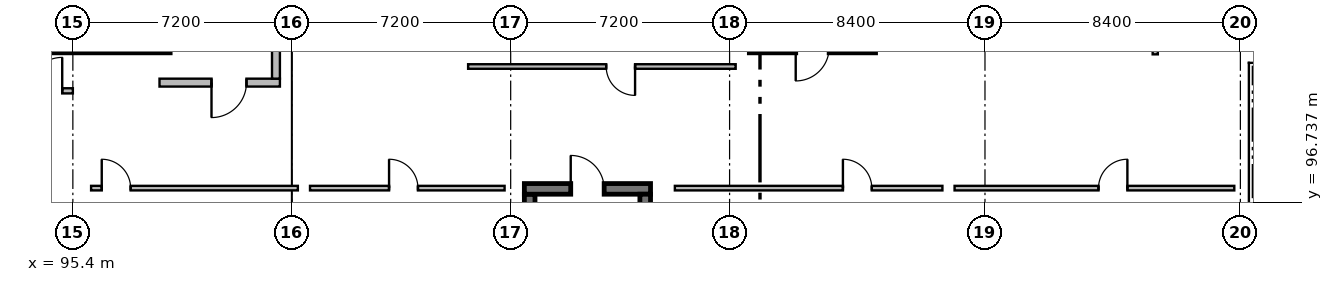
"""IFC4 building model, lengths in metres.
Left out: names, types, materials, properties, quantities, classifications, styles, units other than length and angle.
Written with IfcOpenShell. Run it as: python <this file> out.ifc"""

import sys

from ifc_helpers import new_model, si_unit, direction, frame, frame_2d, origin, place, context, subcontext, project, spatial, rectangle, extrude, element, fill, save


model = new_model("IFC4")
c1 = context("Model", 3, precision=1e-05, world=origin(), true_north=direction((0.0, 1.0)))
c2 = subcontext(c1, "Body", "Model", "MODEL_VIEW")
j1 = project(units=[si_unit("LENGTHUNIT", "METRE"), si_unit("PLANEANGLEUNIT", "RADIAN")], contexts=[c1])
p1 = place(None, origin())
s1 = spatial("IfcSite", under=j1, at=p1, CompositionType="ELEMENT")
p2 = place(p1, origin())
s2 = spatial("IfcBuilding", under=s1, at=p2, CompositionType="ELEMENT")
p3 = place(p2, frame((0.0, 0.0, 4.8)))
s3 = spatial("IfcBuildingStorey", under=s2, at=p3, CompositionType="ELEMENT", Elevation=4.8)
p4 = place(p3, frame((98.6, 101.825, 0.0), z_axis=(0.0, 0.0, 1.0), x_axis=(-1.0, 0.0, 0.0)))
e1 = element("IfcWall", 1, at=p4, inside=s3, PredefinedType="SOLIDWALL", context=c2, shape_type="SweptSolid", body=[
    extrude(rectangle(XDim=4.15, YDim=0.35, at=frame_2d((2.075, 0.0))), origin(), (0.0, 0.0, 1.0), 4.2),
])
p5 = place(p3, frame((102.21, 100.67, 0.0), z_axis=(0.0, 0.0, 1.0), x_axis=(-1.0, 0.0, 0.0)))
e2 = element("IfcWall", 2, at=p5, inside=s3, PredefinedType="SOLIDWALL", context=c2, shape_type="SweptSolid", body=[
    extrude(rectangle(XDim=3.96, YDim=0.26, at=frame_2d((1.98, 0.0))), origin(), (0.0, 0.0, 1.0), 3.94),
])
p6 = place(p5, frame((1.1, 0.0, 0.0)))
e3 = element("IfcOpeningElement", 3, at=p6, cuts=e2, PredefinedType="OPENING", context=c2, shape_type="SweptSolid", body=[
    extrude(rectangle(XDim=1.15, YDim=2.2, at=frame_2d((0.575, 1.1))), frame((0.0, 0.15, 0.0), z_axis=(0.0, -1.0, 0.0), x_axis=(1.0, 0.0, 0.0)), (0.0, 0.0, 1.0), 0.3),
])
p7 = place(p3, frame((102.08, 106.65, 0.0), z_axis=(0.0, 0.0, 1.0), x_axis=(0.0, -1.0, 0.0)))
e4 = element("IfcWall", 4, at=p7, inside=s3, PredefinedType="SOLIDWALL", context=c2, shape_type="SweptSolid", body=[
    extrude(rectangle(XDim=5.85, YDim=0.26, at=frame_2d((2.925, 0.0))), origin(), (0.0, 0.0, 1.0), 3.94),
])
p8 = place(p3, frame((121.8, 101.825, 0.0), z_axis=(0.0, 0.0, 1.0), x_axis=(-1.0, 0.0, 0.0)))
e5 = element("IfcWall", 5, at=p8, inside=s3, PredefinedType="SOLIDWALL", context=c2, shape_type="SweptSolid", body=[
    extrude(rectangle(XDim=4.15, YDim=0.35, at=frame_2d((2.075, 0.0))), origin(), (0.0, 0.0, 1.0), 4.2),
])
p9 = place(p8, frame((1.525, 0.0, 0.0)))
e6 = element("IfcOpeningElement", 6, at=p9, cuts=e5, PredefinedType="OPENING", context=c2, shape_type="SweptSolid", body=[
    extrude(rectangle(XDim=1.1, YDim=2.15, at=frame_2d((0.55, 1.075))), frame((0.0, 0.195, 0.0), z_axis=(0.0, -1.0, 0.0), x_axis=(1.0, 0.0, 0.0)), (0.0, 0.0, 1.0), 0.39),
])
p10 = place(p3, frame((110.425, 89.2, 0.0), z_axis=(0.0, 0.0, 1.0), x_axis=(0.0, 1.0, 0.0)))
e7 = element("IfcWall", 7, at=p10, inside=s3, PredefinedType="SOLIDWALL", context=c2, shape_type="SweptSolid", body=[
    extrude(rectangle(XDim=7.8, YDim=0.35, at=frame_2d((3.9, 0.0))), origin(), (0.0, 0.0, 1.0), 4.2),
])
p11 = place(p3, frame((110.25, 97.175, 0.0), z_axis=(0.0, 0.0, 1.0), x_axis=(1.0, 0.0, 0.0)))
e8 = element("IfcWall", 8, at=p11, inside=s3, PredefinedType="SOLIDWALL", context=c2, shape_type="SweptSolid", body=[
    extrude(rectangle(XDim=4.15, YDim=0.35, at=frame_2d((2.075, 0.0))), origin(), (0.0, 0.0, 1.0), 4.2),
])
p12 = place(p11, frame((1.525, 0.0, 0.0)))
e9 = element("IfcOpeningElement", 9, at=p12, cuts=e8, PredefinedType="OPENING", context=c2, shape_type="SweptSolid", body=[
    extrude(rectangle(XDim=1.1, YDim=2.15, at=frame_2d((0.55, 1.075))), frame((0.0, 0.195, 0.0), z_axis=(0.0, -1.0, 0.0), x_axis=(1.0, 0.0, 0.0)), (0.0, 0.0, 1.0), 0.39),
])
p13 = place(p3, frame((114.225, 97.0, 0.0), z_axis=(0.0, 0.0, 1.0), x_axis=(0.0, -1.0, 0.0)))
e10 = element("IfcWall", 10, at=p13, inside=s3, PredefinedType="SOLIDWALL", context=c2, shape_type="SweptSolid", body=[
    extrude(rectangle(XDim=7.8, YDim=0.35, at=frame_2d((3.9, 0.0))), origin(), (0.0, 0.0, 1.0), 4.2),
])
p14 = place(p3, frame((131.0, 101.6, 0.0), z_axis=(0.0, 0.0, 1.0), x_axis=(0.0, 1.0, 0.0)))
e11 = element("IfcWall", 11, at=p14, inside=s3, PredefinedType="PARTITIONING", context=c2, shape_type="SweptSolid", body=[
    extrude(rectangle(XDim=9.4, YDim=0.17, at=frame_2d((4.7, 0.0))), origin(), (0.0, 0.0, 1.0), 3.94),
])
p15 = place(p14, frame((5.564, 0.0, 0.0)))
e12 = element("IfcOpeningElement", 12, at=p15, cuts=e11, PredefinedType="OPENING", context=c2, shape_type="SweptSolid", body=[
    extrude(rectangle(XDim=1.5, YDim=2.25, at=frame_2d((0.75, 1.125))), frame((0.0, 0.105, 0.0), z_axis=(0.0, -1.0, 0.0), x_axis=(1.0, 0.0, 0.0)), (0.0, 0.0, 1.0), 0.21),
])
p16 = place(p3, frame((96.0, 97.2, 0.0), z_axis=(0.0, 0.0, 1.0), x_axis=(1.0, 0.0, 0.0)))
e13 = element("IfcWall", 13, at=p16, inside=s3, PredefinedType="PARTITIONING", context=c2, shape_type="SweptSolid", body=[
    extrude(rectangle(XDim=6.8, YDim=0.15, at=frame_2d((3.4, 0.0))), origin(), (0.0, 0.0, 1.0), 3.94),
])
p17 = place(p16, frame((0.35, 0.0, 0.0)))
e14 = element("IfcOpeningElement", 14, at=p17, cuts=e13, PredefinedType="OPENING", context=c2, shape_type="SweptSolid", body=[
    extrude(rectangle(XDim=0.95, YDim=2.2, at=frame_2d((0.475, 1.1))), frame((0.0, 0.095, 0.0), z_axis=(0.0, -1.0, 0.0), x_axis=(1.0, 0.0, 0.0)), (0.0, 0.0, 1.0), 0.19),
])
p18 = place(p3, frame((103.2, 97.2, 0.0), z_axis=(0.0, 0.0, 1.0), x_axis=(1.0, 0.0, 0.0)))
e15 = element("IfcWall", 15, at=p18, inside=s3, PredefinedType="PARTITIONING", context=c2, shape_type="SweptSolid", body=[
    extrude(rectangle(XDim=6.4, YDim=0.15, at=frame_2d((3.2, 0.0))), origin(), (0.0, 0.0, 1.0), 3.94),
])
p19 = place(p18, frame((2.6, 0.0, 0.0)))
e16 = element("IfcOpeningElement", 16, at=p19, cuts=e15, PredefinedType="OPENING", context=c2, shape_type="SweptSolid", body=[
    extrude(rectangle(XDim=0.95, YDim=2.2, at=frame_2d((0.475, 1.1))), frame((0.0, 0.095, 0.0), z_axis=(0.0, -1.0, 0.0), x_axis=(1.0, 0.0, 0.0)), (0.0, 0.0, 1.0), 0.19),
])
p20 = place(p3, frame((115.2, 97.2, 0.0), z_axis=(0.0, 0.0, 1.0), x_axis=(1.0, 0.0, 0.0)))
e17 = element("IfcWall", 17, at=p20, inside=s3, PredefinedType="PARTITIONING", context=c2, shape_type="SweptSolid", body=[
    extrude(rectangle(XDim=8.8, YDim=0.15, at=frame_2d((4.4, 0.0))), origin(), (0.0, 0.0, 1.0), 3.94),
])
p21 = place(p20, frame((5.528, 0.0, 0.0)))
e18 = element("IfcOpeningElement", 18, at=p21, cuts=e17, PredefinedType="OPENING", context=c2, shape_type="SweptSolid", body=[
    extrude(rectangle(XDim=0.95, YDim=2.2, at=frame_2d((0.475, 1.1))), frame((0.0, 0.095, 0.0), z_axis=(0.0, -1.0, 0.0), x_axis=(1.0, 0.0, 0.0)), (0.0, 0.0, 1.0), 0.19),
])
p22 = place(p3, frame((117.2, 101.2, 0.0), z_axis=(0.0, 0.0, 1.0), x_axis=(-1.0, 0.0, 0.0)))
e19 = element("IfcWall", 19, at=p22, inside=s3, PredefinedType="PARTITIONING", context=c2, shape_type="SweptSolid", body=[
    extrude(rectangle(XDim=8.8, YDim=0.15, at=frame_2d((4.4, 0.0))), origin(), (0.0, 0.0, 1.0), 3.94),
])
p23 = place(p22, frame((3.309, 0.0, 0.0)))
e20 = element("IfcOpeningElement", 20, at=p23, cuts=e19, PredefinedType="OPENING", context=c2, shape_type="SweptSolid", body=[
    extrude(rectangle(XDim=0.95, YDim=2.2, at=frame_2d((0.475, 1.1))), frame((0.0, 0.095, 0.0), z_axis=(0.0, -1.0, 0.0), x_axis=(1.0, 0.0, 0.0)), (0.0, 0.0, 1.0), 0.19),
])
p24 = place(p3, frame((90.2, 100.4, 0.0), z_axis=(0.0, 0.0, 1.0), x_axis=(1.0, 0.0, 0.0)))
e21 = element("IfcWall", 21, at=p24, inside=s3, PredefinedType="PARTITIONING", context=c2, shape_type="SweptSolid", body=[
    extrude(rectangle(XDim=5.2, YDim=0.17, at=frame_2d((2.6, 0.0))), origin(), (0.0, 0.0, 1.0), 3.94),
])
p25 = place(p24, frame((3.75, 0.0, 0.0)))
e22 = element("IfcOpeningElement", 22, at=p25, cuts=e21, PredefinedType="OPENING", context=c2, shape_type="SweptSolid", body=[
    extrude(rectangle(XDim=1.1, YDim=2.1, at=frame_2d((0.55, 1.05))), frame((0.0, 0.105, 0.0), z_axis=(0.0, -1.0, 0.0), x_axis=(1.0, 0.0, 0.0)), (0.0, 0.0, 1.0), 0.21),
])
p26 = place(p3, frame((124.4, 97.2, 0.0), z_axis=(0.0, 0.0, 1.0), x_axis=(1.0, 0.0, 0.0)))
e23 = element("IfcWall", 23, at=p26, inside=s3, PredefinedType="PARTITIONING", context=c2, shape_type="SweptSolid", body=[
    extrude(rectangle(XDim=9.2, YDim=0.15, at=frame_2d((4.6, 0.0))), origin(), (0.0, 0.0, 1.0), 3.94),
])
p27 = place(p26, frame((4.734, 0.0, 0.0)))
e24 = element("IfcOpeningElement", 24, at=p27, cuts=e23, PredefinedType="OPENING", context=c2, shape_type="SweptSolid", body=[
    extrude(rectangle(XDim=0.95, YDim=2.2, at=frame_2d((0.475, 1.1))), frame((0.0, 0.095, 0.0), z_axis=(0.0, -1.0, 0.0), x_axis=(1.0, 0.0, 0.0)), (0.0, 0.0, 1.0), 0.19),
])
p28 = place(p6, origin())
e25 = element("IfcDoor", 25, at=p28, inside=s3, OperationType="SINGLE_SWING_RIGHT", PredefinedType="DOOR", context=c2, shape_type="SweptSolid", body=[
    extrude(rectangle(XDim=1.15, YDim=2.2, at=frame_2d((0.575, 1.1))), frame((0.0, 0.025, 0.0), z_axis=(0.0, -1.0, 0.0), x_axis=(1.0, 0.0, 0.0)), (0.0, 0.0, 1.0), 0.05),
])
fill(e3, e25)
p29 = place(p12, origin())
e26 = element("IfcDoor", 26, at=p29, inside=s3, OperationType="SINGLE_SWING_LEFT", PredefinedType="DOOR", context=c2, shape_type="SweptSolid", body=[
    extrude(rectangle(XDim=1.1, YDim=2.15, at=frame_2d((0.55, 1.075))), frame((0.0, 0.025, 0.0), z_axis=(0.0, -1.0, 0.0), x_axis=(1.0, 0.0, 0.0)), (0.0, 0.0, 1.0), 0.05),
])
fill(e9, e26)
p30 = place(p17, origin())
e27 = element("IfcDoor", 27, at=p30, inside=s3, OperationType="SINGLE_SWING_LEFT", PredefinedType="DOOR", context=c2, shape_type="SweptSolid", body=[
    extrude(rectangle(XDim=0.95, YDim=2.2, at=frame_2d((0.475, 1.1))), frame((0.0, 0.025, 0.0), z_axis=(0.0, -1.0, 0.0), x_axis=(1.0, 0.0, 0.0)), (0.0, 0.0, 1.0), 0.05),
])
fill(e14, e27)
p31 = place(p19, origin())
e28 = element("IfcDoor", 28, at=p31, inside=s3, OperationType="SINGLE_SWING_LEFT", PredefinedType="DOOR", context=c2, shape_type="SweptSolid", body=[
    extrude(rectangle(XDim=0.95, YDim=2.2, at=frame_2d((0.475, 1.1))), frame((0.0, 0.025, 0.0), z_axis=(0.0, -1.0, 0.0), x_axis=(1.0, 0.0, 0.0)), (0.0, 0.0, 1.0), 0.05),
])
fill(e16, e28)
p32 = place(p21, origin())
e29 = element("IfcDoor", 29, at=p32, inside=s3, OperationType="SINGLE_SWING_LEFT", PredefinedType="DOOR", context=c2, shape_type="SweptSolid", body=[
    extrude(rectangle(XDim=0.95, YDim=2.2, at=frame_2d((0.475, 1.1))), frame((0.0, 0.025, 0.0), z_axis=(0.0, -1.0, 0.0), x_axis=(1.0, 0.0, 0.0)), (0.0, 0.0, 1.0), 0.05),
])
fill(e18, e29)
p33 = place(p23, origin())
e30 = element("IfcDoor", 30, at=p33, inside=s3, OperationType="SINGLE_SWING_LEFT", PredefinedType="DOOR", context=c2, shape_type="SweptSolid", body=[
    extrude(rectangle(XDim=0.95, YDim=2.2, at=frame_2d((0.475, 1.1))), frame((0.0, 0.025, 0.0), z_axis=(0.0, -1.0, 0.0), x_axis=(1.0, 0.0, 0.0)), (0.0, 0.0, 1.0), 0.05),
])
fill(e20, e30)
p34 = place(p25, origin())
e31 = element("IfcDoor", 31, at=p34, inside=s3, OperationType="SINGLE_SWING_RIGHT", PredefinedType="DOOR", context=c2, shape_type="SweptSolid", body=[
    extrude(rectangle(XDim=1.1, YDim=2.1, at=frame_2d((0.55, 1.05))), frame((0.0, 0.025, 0.0), z_axis=(0.0, -1.0, 0.0), x_axis=(1.0, 0.0, 0.0)), (0.0, 0.0, 1.0), 0.05),
])
fill(e22, e31)
p35 = place(p27, origin())
e32 = element("IfcDoor", 32, at=p35, inside=s3, OperationType="SINGLE_SWING_RIGHT", PredefinedType="DOOR", context=c2, shape_type="SweptSolid", body=[
    extrude(rectangle(XDim=0.95, YDim=2.2, at=frame_2d((0.475, 1.1))), frame((0.0, 0.025, 0.0), z_axis=(0.0, -1.0, 0.0), x_axis=(1.0, 0.0, 0.0)), (0.0, 0.0, 1.0), 0.05),
])
fill(e24, e32)
save(model, sys.argv[1])
